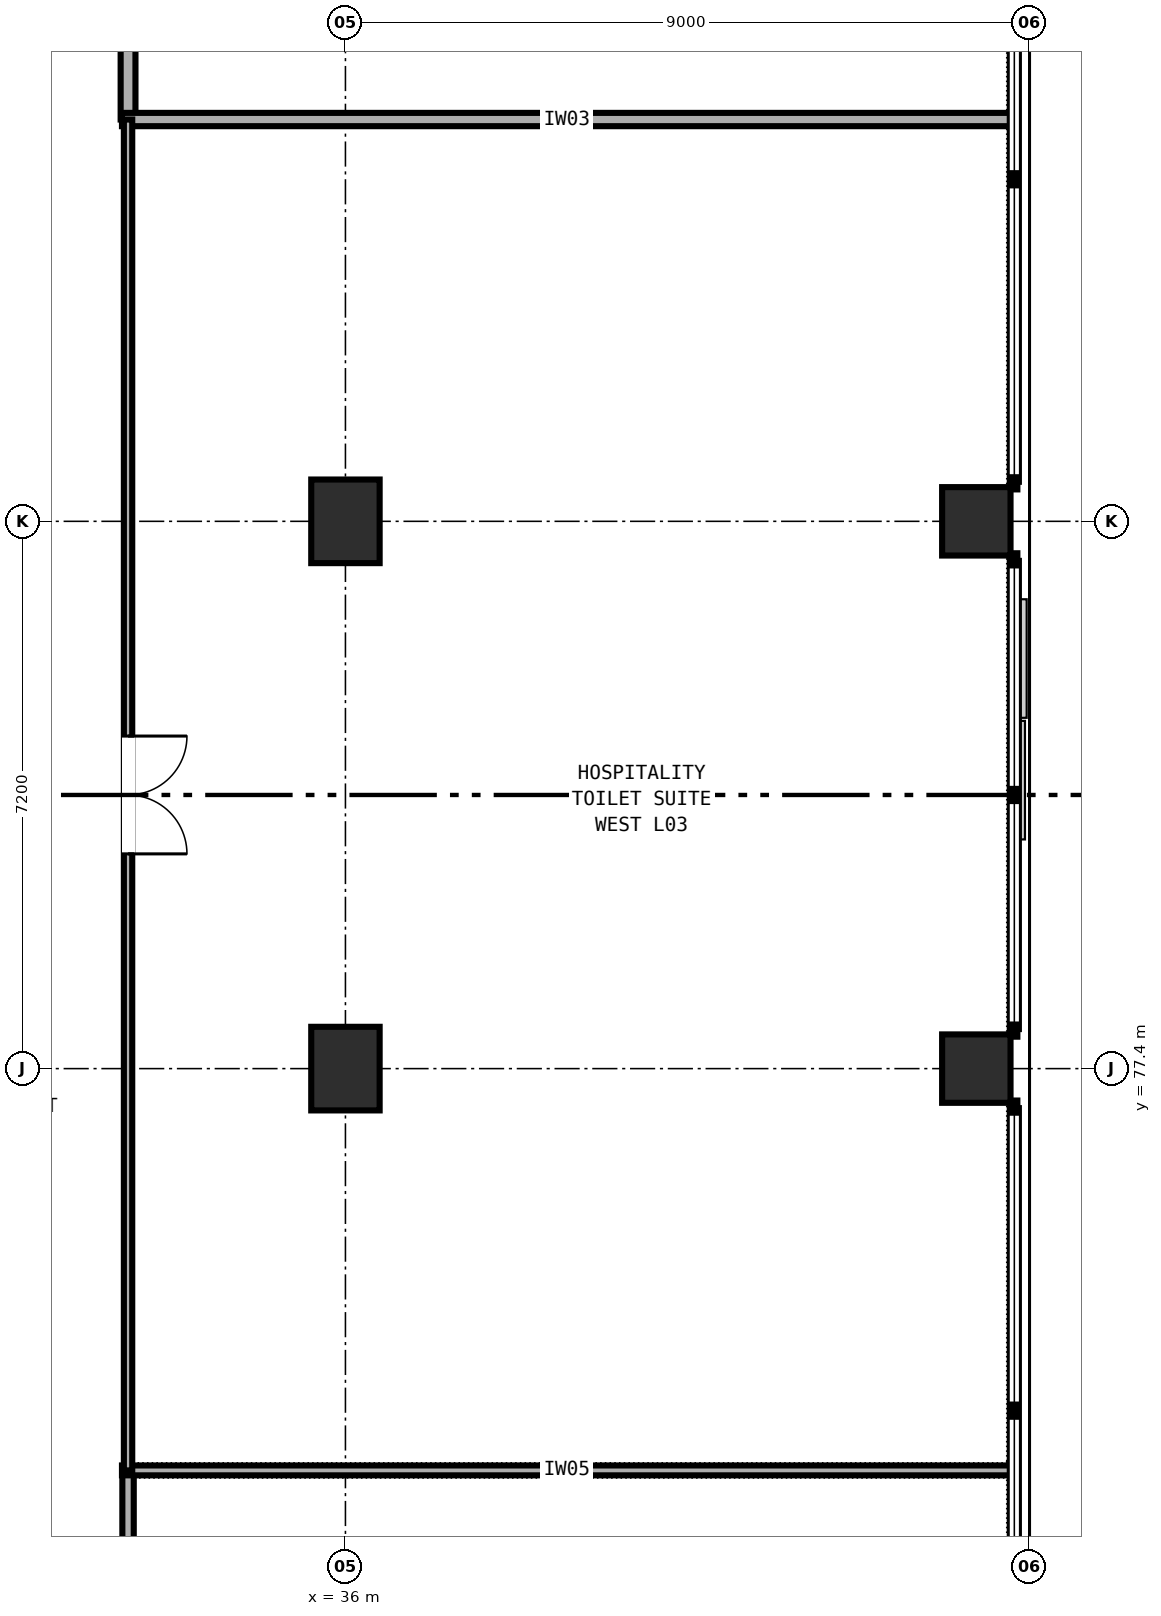
"""IFC4 building model, lengths in metres.
Left out: names, types, materials, properties, quantities, classifications, styles, units other than length and angle.
Written with IfcOpenShell. Run it as: python <this file> out.ifc"""

import sys

from ifc_helpers import new_model, si_unit, direction, frame, frame_2d, origin, origin_2d, place, context, subcontext, project, spatial, rectangle, extrude, element, fill, save


model = new_model("IFC4")
c1 = context("Model", 3, precision=1e-05, world=origin(), true_north=direction((0.0, 1.0)))
c2 = subcontext(c1, "Body", "Model", "MODEL_VIEW")
j1 = project(units=[si_unit("LENGTHUNIT", "METRE"), si_unit("PLANEANGLEUNIT", "RADIAN")], contexts=[c1])
p1 = place(None, origin())
s1 = spatial("IfcSite", under=j1, at=p1, CompositionType="ELEMENT")
p2 = place(p1, origin())
s2 = spatial("IfcBuilding", under=s1, at=p2, CompositionType="ELEMENT")
p3 = place(p2, frame((0.0, 0.0, 14.4)))
s3 = spatial("IfcBuildingStorey", under=s2, at=p3, CompositionType="ELEMENT", Elevation=14.4)
for number, where, z_axis, x_axis in (
    (1, (36.0, 77.4, 0.0), (0.0, 0.0, 1.0), (1.0, 0.0, 0.0)),
    (2, (36.0, 84.6, 0.0), (0.0, 0.0, 1.0), (1.0, 0.0, 0.0)),
):
    element("IfcColumn", number, at=place(p3, frame(where, z_axis=z_axis, x_axis=x_axis)), inside=s3, PredefinedType="COLUMN", context=c2, shape_type="SweptSolid", body=[
        extrude(rectangle(XDim=0.9, YDim=1.1, at=origin_2d()), origin(), (0.0, 0.0, 1.0), 4.8),
    ])
for number, where, z_axis, x_axis in (
    (3, (44.3, 77.4, 0.0), (0.0, 0.0, 1.0), (1.0, 0.0, 0.0)),
    (4, (44.3, 84.6, 0.0), (0.0, 0.0, 1.0), (1.0, 0.0, 0.0)),
):
    element("IfcColumn", number, at=place(p3, frame(where, z_axis=z_axis, x_axis=x_axis)), inside=s3, PredefinedType="COLUMN", context=c2, shape_type="SweptSolid", body=[
        extrude(rectangle(XDim=0.9, YDim=0.9, at=origin_2d()), origin(), (0.0, 0.0, 1.0), 4.8),
    ])
p4 = place(p3, frame((33.14, 107.658, 0.0), z_axis=(0.0, 0.0, 1.0), x_axis=(0.0, -1.0, 0.0)))
e5 = element("IfcWall", 5, at=p4, inside=s3, PredefinedType="PARTITIONING", context=c2, shape_type="SweptSolid", body=[
    extrude(rectangle(XDim=17.772, YDim=0.195, at=frame_2d((8.886, 0.0))), origin(), (0.0, 0.0, 1.0), 3.56),
])
p5 = place(p4, frame((8.186, 0.0, 0.0)))
e6 = element("IfcOpeningElement", 6, at=p5, cuts=e5, PredefinedType="OPENING", context=c2, shape_type="SweptSolid", body=[
    extrude(rectangle(XDim=1.4, YDim=2.15, at=frame_2d((0.7, 1.075))), frame((0.0, 0.107, 0.0), z_axis=(0.0, -1.0, 0.0), x_axis=(1.0, 0.0, 0.0)), (0.0, 0.0, 1.0), 0.215),
])
p6 = place(p3, frame((44.767, 89.886, 0.0), z_axis=(0.0, 0.0, 1.0), x_axis=(-1.0, 0.0, 0.0)))
e7 = element("IfcWall", 7, at=p6, inside=s3, PredefinedType="PARTITIONING", context=c2, shape_type="SweptSolid", body=[
    extrude(rectangle(XDim=11.707, YDim=0.175, at=frame_2d((5.854, 0.0))), origin(), (0.0, 0.0, 1.0), 3.56),
])
p7 = place(p3, frame((33.14, 72.114, 0.0), z_axis=(0.0, 0.0, 1.0), x_axis=(0.0, -1.0, 0.0)))
e8 = element("IfcWall", 8, at=p7, inside=s3, PredefinedType="PARTITIONING", context=c2, shape_type="SweptSolid", body=[
    extrude(rectangle(XDim=17.772, YDim=0.15, at=frame_2d((8.886, 0.0))), origin(), (0.0, 0.0, 1.0), 3.56),
])
p8 = place(p7, frame((8.036, 0.0, 0.0)))
e9 = element("IfcOpeningElement", 9, at=p8, cuts=e8, PredefinedType="OPENING", context=c2, shape_type="SweptSolid", body=[
    extrude(rectangle(XDim=1.7, YDim=2.2, at=frame_2d((0.85, 1.1))), frame((0.0, 0.085, 0.0), z_axis=(0.0, -1.0, 0.0), x_axis=(1.0, 0.0, 0.0)), (0.0, 0.0, 1.0), 0.17),
])
p9 = place(p3, frame((33.06, 72.114, 0.0), z_axis=(0.0, 0.0, 1.0), x_axis=(1.0, 0.0, 0.0)))
e10 = element("IfcWall", 10, at=p9, inside=s3, PredefinedType="PARTITIONING", context=c2, shape_type="SweptSolid", body=[
    extrude(rectangle(XDim=11.707, YDim=0.13, at=frame_2d((5.854, 0.0))), origin(), (0.0, 0.0, 1.0), 3.56),
])
p10 = place(p3, frame((33.14, 89.886, 0.0), z_axis=(0.0, 0.0, 1.0), x_axis=(0.0, -1.0, 0.0)))
e11 = element("IfcWall", 11, at=p10, inside=s3, PredefinedType="PARTITIONING", context=c2, shape_type="SweptSolid", body=[
    extrude(rectangle(XDim=17.772, YDim=0.11, at=frame_2d((8.886, 0.0))), origin(), (0.0, 0.0, 1.0), 3.56),
])
p11 = place(p10, frame((8.111, 0.0, 0.0)))
e12 = element("IfcOpeningElement", 12, at=p11, cuts=e11, PredefinedType="OPENING", context=c2, shape_type="SweptSolid", body=[
    extrude(rectangle(XDim=1.55, YDim=2.2, at=frame_2d((0.775, 1.1))), frame((0.0, 0.065, 0.0), z_axis=(0.0, -1.0, 0.0), x_axis=(1.0, 0.0, 0.0)), (0.0, 0.0, 1.0), 0.13),
])
p12 = place(p11, origin())
e13 = element("IfcDoor", 13, at=p12, inside=s3, OperationType="DOUBLE_DOOR_SINGLE_SWING", PredefinedType="DOOR", context=c2, shape_type="SweptSolid", body=[
    extrude(rectangle(XDim=1.55, YDim=2.2, at=frame_2d((0.775, 1.1))), frame((0.0, 0.025, 0.0), z_axis=(0.0, -1.0, 0.0), x_axis=(1.0, 0.0, 0.0)), (0.0, 0.0, 1.0), 0.05),
])
fill(e12, e13)
save(model, sys.argv[1])
